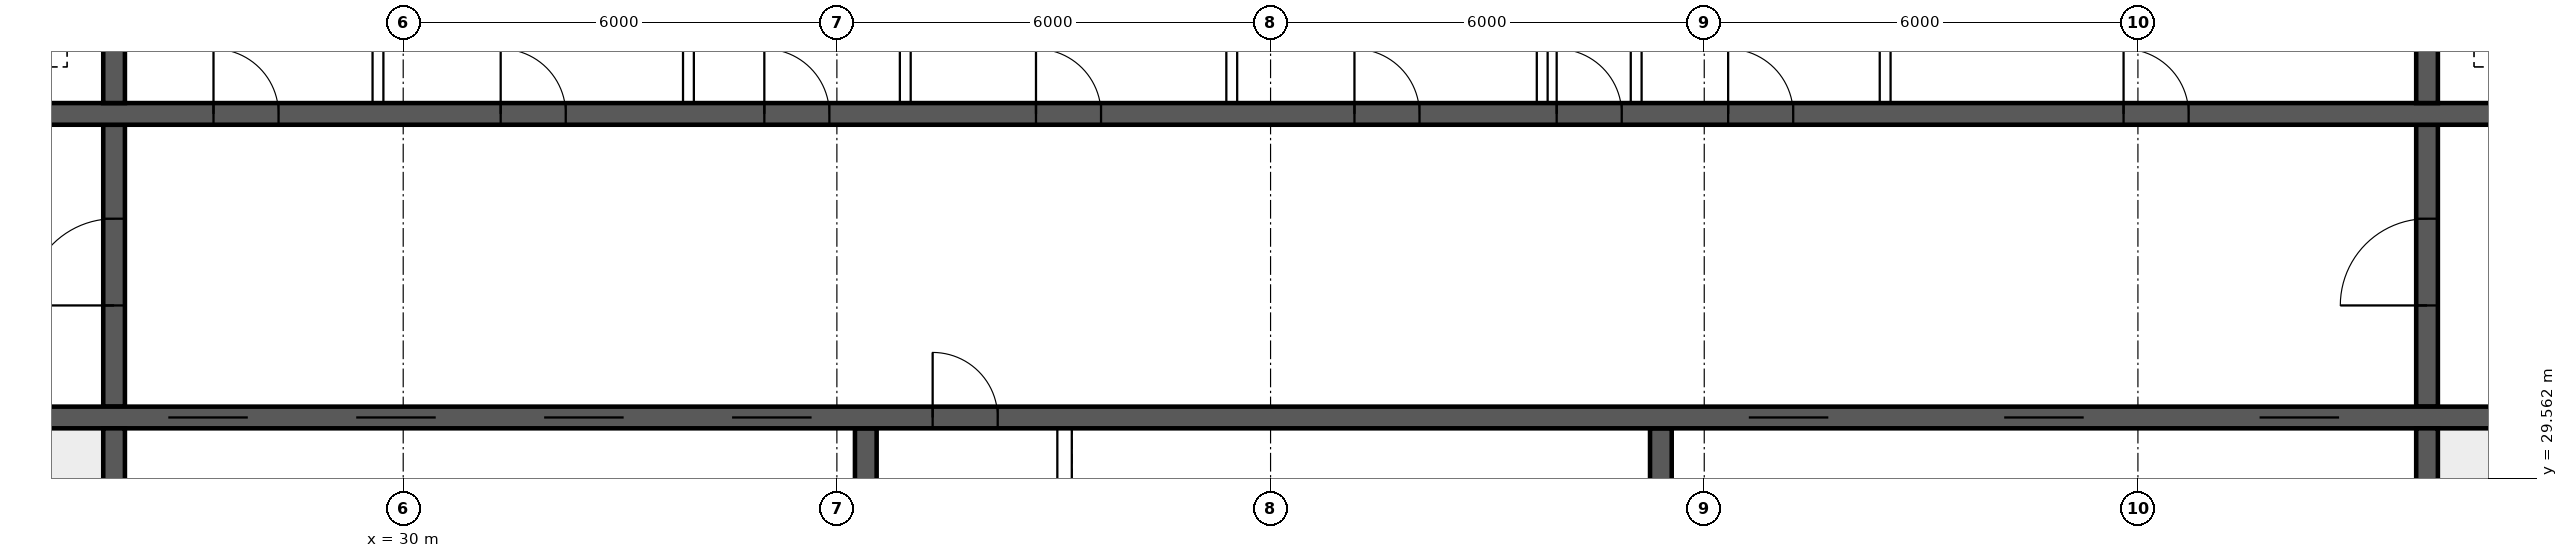
"""IFC4 building model, lengths in metres.
Left out: names, types, materials, properties, quantities, classifications, styles, units other than length and angle.
Written with IfcOpenShell. Run it as: python <this file> out.ifc"""

import sys

from ifc_helpers import new_model, si_unit, direction, frame, frame_2d, origin, place, context, subcontext, project, spatial, rectangle, extrude, element, fill, save


model = new_model("IFC4")
c1 = context("Model", 3, precision=1e-05, world=origin(), true_north=direction((0.0, 1.0)))
c2 = subcontext(c1, "Body", "Model", "MODEL_VIEW")
j1 = project(units=[si_unit("LENGTHUNIT", "METRE"), si_unit("PLANEANGLEUNIT", "RADIAN")], contexts=[c1])
p1 = place(None, origin())
s1 = spatial("IfcSite", under=j1, at=p1, CompositionType="ELEMENT")
p2 = place(p1, origin())
s2 = spatial("IfcBuilding", under=s1, at=p2, CompositionType="ELEMENT")
p3 = place(p2, frame((0.0, 0.0, 106.9)))
s3 = spatial("IfcBuildingStorey", under=s2, at=p3, CompositionType="ELEMENT", Elevation=106.9)
p4 = place(p3, frame((18.475, 30.4, 0.0), z_axis=(0.0, 0.0, 1.0), x_axis=(1.0, 0.0, 0.0)))
e1 = element("IfcWall", 1, at=p4, inside=s3, PredefinedType="SHEAR", context=c2, shape_type="SweptSolid", body=[
    extrude(rectangle(XDim=47.05, YDim=0.3, at=frame_2d((23.525, 0.0))), origin(), (0.0, 0.0, 1.0), 3.75),
])
p5 = place(p4, frame((0.4, 0.0, 0.0)))
e2 = element("IfcOpeningElement", 2, at=p5, cuts=e1, PredefinedType="OPENING", context=c2, shape_type="SweptSolid", body=[
    extrude(rectangle(XDim=1.0, YDim=2.1, at=frame_2d((0.5, 1.05))), frame((0.0, 0.16, 0.0), z_axis=(0.0, -1.0, 0.0), x_axis=(1.0, 0.0, 0.0)), (0.0, 0.0, 1.0), 0.32),
])
p6 = place(p4, frame((45.65, 0.0, 0.0)))
e3 = element("IfcOpeningElement", 3, at=p6, cuts=e1, PredefinedType="OPENING", context=c2, shape_type="SweptSolid", body=[
    extrude(rectangle(XDim=1.0, YDim=2.1, at=frame_2d((0.5, 1.05))), frame((0.0, 0.16, 0.0), z_axis=(0.0, -1.0, 0.0), x_axis=(1.0, 0.0, 0.0)), (0.0, 0.0, 1.0), 0.32),
])
p7 = place(p4, frame((8.275, 0.0, 0.0)))
e4 = element("IfcOpeningElement", 4, at=p7, cuts=e1, PredefinedType="OPENING", context=c2, shape_type="SweptSolid", body=[
    extrude(rectangle(XDim=1.1, YDim=2.1, at=frame_2d((0.55, 1.05))), frame((0.0, 0.16, 0.0), z_axis=(0.0, -1.0, 0.0), x_axis=(1.0, 0.0, 0.0)), (0.0, 0.0, 1.0), 0.32),
])
p8 = place(p4, frame((10.875, 0.0, 0.0)))
e5 = element("IfcOpeningElement", 5, at=p8, cuts=e1, PredefinedType="OPENING", context=c2, shape_type="SweptSolid", body=[
    extrude(rectangle(XDim=1.1, YDim=2.1, at=frame_2d((0.55, 1.05))), frame((0.0, 0.16, 0.0), z_axis=(0.0, -1.0, 0.0), x_axis=(1.0, 0.0, 0.0)), (0.0, 0.0, 1.0), 0.32),
])
p9 = place(p4, frame((13.475, 0.0, 0.0)))
e6 = element("IfcOpeningElement", 6, at=p9, cuts=e1, PredefinedType="OPENING", context=c2, shape_type="SweptSolid", body=[
    extrude(rectangle(XDim=1.1, YDim=2.1, at=frame_2d((0.55, 1.05))), frame((0.0, 0.16, 0.0), z_axis=(0.0, -1.0, 0.0), x_axis=(1.0, 0.0, 0.0)), (0.0, 0.0, 1.0), 0.32),
])
p10 = place(p4, frame((16.075, 0.0, 0.0)))
e7 = element("IfcOpeningElement", 7, at=p10, cuts=e1, PredefinedType="OPENING", context=c2, shape_type="SweptSolid", body=[
    extrude(rectangle(XDim=1.1, YDim=2.1, at=frame_2d((0.55, 1.05))), frame((0.0, 0.16, 0.0), z_axis=(0.0, -1.0, 0.0), x_axis=(1.0, 0.0, 0.0)), (0.0, 0.0, 1.0), 0.32),
])
p11 = place(p4, frame((18.85, 0.0, 0.0)))
e8 = element("IfcOpeningElement", 8, at=p11, cuts=e1, PredefinedType="OPENING", context=c2, shape_type="SweptSolid", body=[
    extrude(rectangle(XDim=0.9, YDim=2.1, at=frame_2d((0.45, 1.05))), frame((0.0, 0.16, 0.0), z_axis=(0.0, -1.0, 0.0), x_axis=(1.0, 0.0, 0.0)), (0.0, 0.0, 1.0), 0.32),
])
p12 = place(p4, frame((30.142, 0.0, 0.0)))
e9 = element("IfcOpeningElement", 9, at=p12, cuts=e1, PredefinedType="OPENING", context=c2, shape_type="SweptSolid", body=[
    extrude(rectangle(XDim=1.1, YDim=2.1, at=frame_2d((0.55, 1.05))), frame((0.0, 0.16, 0.0), z_axis=(0.0, -1.0, 0.0), x_axis=(1.0, 0.0, 0.0)), (0.0, 0.0, 1.0), 0.32),
])
p13 = place(p4, frame((33.675, 0.0, 0.0)))
e10 = element("IfcOpeningElement", 10, at=p13, cuts=e1, PredefinedType="OPENING", context=c2, shape_type="SweptSolid", body=[
    extrude(rectangle(XDim=1.1, YDim=2.1, at=frame_2d((0.55, 1.05))), frame((0.0, 0.16, 0.0), z_axis=(0.0, -1.0, 0.0), x_axis=(1.0, 0.0, 0.0)), (0.0, 0.0, 1.0), 0.32),
])
p14 = place(p4, frame((37.208, 0.0, 0.0)))
e11 = element("IfcOpeningElement", 11, at=p14, cuts=e1, PredefinedType="OPENING", context=c2, shape_type="SweptSolid", body=[
    extrude(rectangle(XDim=1.1, YDim=2.1, at=frame_2d((0.55, 1.05))), frame((0.0, 0.16, 0.0), z_axis=(0.0, -1.0, 0.0), x_axis=(1.0, 0.0, 0.0)), (0.0, 0.0, 1.0), 0.32),
])
p15 = place(p3, frame((18.475, 34.6, 0.0), z_axis=(0.0, 0.0, 1.0), x_axis=(1.0, 0.0, 0.0)))
e12 = element("IfcWall", 12, at=p15, inside=s3, PredefinedType="SHEAR", context=c2, shape_type="SweptSolid", body=[
    extrude(rectangle(XDim=47.05, YDim=0.3, at=frame_2d((23.525, 0.0))), origin(), (0.0, 0.0, 1.0), 3.75),
])
p16 = place(p15, frame((0.9, 0.0, 0.0)))
e13 = element("IfcOpeningElement", 13, at=p16, cuts=e12, PredefinedType="OPENING", context=c2, shape_type="SweptSolid", body=[
    extrude(rectangle(XDim=1.1, YDim=2.1, at=frame_2d((0.55, 1.05))), frame((0.0, 0.16, 0.0), z_axis=(0.0, -1.0, 0.0), x_axis=(1.0, 0.0, 0.0)), (0.0, 0.0, 1.0), 0.32),
])
p17 = place(p15, frame((45.05, 0.0, 0.0)))
e14 = element("IfcOpeningElement", 14, at=p17, cuts=e12, PredefinedType="OPENING", context=c2, shape_type="SweptSolid", body=[
    extrude(rectangle(XDim=1.1, YDim=2.1, at=frame_2d((0.55, 1.05))), frame((0.0, 0.16, 0.0), z_axis=(0.0, -1.0, 0.0), x_axis=(1.0, 0.0, 0.0)), (0.0, 0.0, 1.0), 0.32),
])
p18 = place(p15, frame((4.125, 0.0, 0.0)))
e15 = element("IfcOpeningElement", 15, at=p18, cuts=e12, PredefinedType="OPENING", context=c2, shape_type="SweptSolid", body=[
    extrude(rectangle(XDim=0.9, YDim=2.1, at=frame_2d((0.45, 1.05))), frame((0.0, 0.16, 0.0), z_axis=(0.0, -1.0, 0.0), x_axis=(1.0, 0.0, 0.0)), (0.0, 0.0, 1.0), 0.32),
])
p19 = place(p15, frame((42.025, 0.0, 0.0)))
e16 = element("IfcOpeningElement", 16, at=p19, cuts=e12, PredefinedType="OPENING", context=c2, shape_type="SweptSolid", body=[
    extrude(rectangle(XDim=0.9, YDim=2.1, at=frame_2d((0.45, 1.05))), frame((0.0, 0.16, 0.0), z_axis=(0.0, -1.0, 0.0), x_axis=(1.0, 0.0, 0.0)), (0.0, 0.0, 1.0), 0.32),
])
p20 = place(p15, frame((8.9, 0.0, 0.0)))
e17 = element("IfcOpeningElement", 17, at=p20, cuts=e12, PredefinedType="OPENING", context=c2, shape_type="SweptSolid", body=[
    extrude(rectangle(XDim=0.9, YDim=2.1, at=frame_2d((0.45, 1.05))), frame((0.0, 0.16, 0.0), z_axis=(0.0, -1.0, 0.0), x_axis=(1.0, 0.0, 0.0)), (0.0, 0.0, 1.0), 0.32),
])
p21 = place(p15, frame((12.874, 0.0, 0.0)))
e18 = element("IfcOpeningElement", 18, at=p21, cuts=e12, PredefinedType="OPENING", context=c2, shape_type="SweptSolid", body=[
    extrude(rectangle(XDim=0.9, YDim=2.1, at=frame_2d((0.45, 1.05))), frame((0.0, 0.16, 0.0), z_axis=(0.0, -1.0, 0.0), x_axis=(1.0, 0.0, 0.0)), (0.0, 0.0, 1.0), 0.32),
])
p22 = place(p15, frame((16.521, 0.0, 0.0)))
e19 = element("IfcOpeningElement", 19, at=p22, cuts=e12, PredefinedType="OPENING", context=c2, shape_type="SweptSolid", body=[
    extrude(rectangle(XDim=0.9, YDim=2.1, at=frame_2d((0.45, 1.05))), frame((0.0, 0.16, 0.0), z_axis=(0.0, -1.0, 0.0), x_axis=(1.0, 0.0, 0.0)), (0.0, 0.0, 1.0), 0.32),
])
p23 = place(p15, frame((20.28, 0.0, 0.0)))
e20 = element("IfcOpeningElement", 20, at=p23, cuts=e12, PredefinedType="OPENING", context=c2, shape_type="SweptSolid", body=[
    extrude(rectangle(XDim=0.9, YDim=2.1, at=frame_2d((0.45, 1.05))), frame((0.0, 0.16, 0.0), z_axis=(0.0, -1.0, 0.0), x_axis=(1.0, 0.0, 0.0)), (0.0, 0.0, 1.0), 0.32),
])
p24 = place(p15, frame((24.686, 0.0, 0.0)))
e21 = element("IfcOpeningElement", 21, at=p24, cuts=e12, PredefinedType="OPENING", context=c2, shape_type="SweptSolid", body=[
    extrude(rectangle(XDim=0.9, YDim=2.1, at=frame_2d((0.45, 1.05))), frame((0.0, 0.16, 0.0), z_axis=(0.0, -1.0, 0.0), x_axis=(1.0, 0.0, 0.0)), (0.0, 0.0, 1.0), 0.32),
])
p25 = place(p15, frame((27.483, 0.0, 0.0)))
e22 = element("IfcOpeningElement", 22, at=p25, cuts=e12, PredefinedType="OPENING", context=c2, shape_type="SweptSolid", body=[
    extrude(rectangle(XDim=0.9, YDim=2.1, at=frame_2d((0.45, 1.05))), frame((0.0, 0.16, 0.0), z_axis=(0.0, -1.0, 0.0), x_axis=(1.0, 0.0, 0.0)), (0.0, 0.0, 1.0), 0.32),
])
p26 = place(p15, frame((29.856, 0.0, 0.0)))
e23 = element("IfcOpeningElement", 23, at=p26, cuts=e12, PredefinedType="OPENING", context=c2, shape_type="SweptSolid", body=[
    extrude(rectangle(XDim=0.9, YDim=2.1, at=frame_2d((0.45, 1.05))), frame((0.0, 0.16, 0.0), z_axis=(0.0, -1.0, 0.0), x_axis=(1.0, 0.0, 0.0)), (0.0, 0.0, 1.0), 0.32),
])
p27 = place(p15, frame((35.326, 0.0, 0.0)))
e24 = element("IfcOpeningElement", 24, at=p27, cuts=e12, PredefinedType="OPENING", context=c2, shape_type="SweptSolid", body=[
    extrude(rectangle(XDim=0.9, YDim=2.1, at=frame_2d((0.45, 1.05))), frame((0.0, 0.16, 0.0), z_axis=(0.0, -1.0, 0.0), x_axis=(1.0, 0.0, 0.0)), (0.0, 0.0, 1.0), 0.32),
])
for number, where, z_axis, x_axis in (
    (25, (26.0, 26.275, 0.0), (0.0, 0.0, 1.0), (0.0, 1.0, 0.0)),
    (26, (58.0, 26.275, 0.0), (0.0, 0.0, 1.0), (0.0, 1.0, 0.0)),
):
    element("IfcWall", number, at=place(p3, frame(where, z_axis=z_axis, x_axis=x_axis)), inside=s3, PredefinedType="SHEAR", context=c2, shape_type="SweptSolid", body=[
        extrude(rectangle(XDim=3.975, YDim=0.3, at=frame_2d((1.988, 0.0))), origin(), (0.0, 0.0, 1.0), 3.75),
    ])
p28 = place(p3, frame((26.0, 30.55, 0.0), z_axis=(0.0, 0.0, 1.0), x_axis=(0.0, 1.0, 0.0)))
e27 = element("IfcWall", 27, at=p28, inside=s3, PredefinedType="SHEAR", context=c2, shape_type="SweptSolid", body=[
    extrude(rectangle(XDim=3.9, YDim=0.3, at=frame_2d((1.95, 0.0))), origin(), (0.0, 0.0, 1.0), 3.75),
])
p29 = place(p28, frame((1.4, 0.0, 0.0)))
e28 = element("IfcOpeningElement", 28, at=p29, cuts=e27, PredefinedType="OPENING", context=c2, shape_type="SweptSolid", body=[
    extrude(rectangle(XDim=1.2, YDim=2.1, at=frame_2d((0.6, 1.05))), frame((0.0, 0.16, 0.0), z_axis=(0.0, -1.0, 0.0), x_axis=(1.0, 0.0, 0.0)), (0.0, 0.0, 1.0), 0.32),
])
p30 = place(p3, frame((58.0, 30.55, 0.0), z_axis=(0.0, 0.0, 1.0), x_axis=(0.0, 1.0, 0.0)))
e29 = element("IfcWall", 29, at=p30, inside=s3, PredefinedType="SHEAR", context=c2, shape_type="SweptSolid", body=[
    extrude(rectangle(XDim=3.9, YDim=0.3, at=frame_2d((1.95, 0.0))), origin(), (0.0, 0.0, 1.0), 3.75),
])
p31 = place(p30, frame((1.4, 0.0, 0.0)))
e30 = element("IfcOpeningElement", 30, at=p31, cuts=e29, PredefinedType="OPENING", context=c2, shape_type="SweptSolid", body=[
    extrude(rectangle(XDim=1.2, YDim=2.1, at=frame_2d((0.6, 1.05))), frame((0.0, 0.16, 0.0), z_axis=(0.0, -1.0, 0.0), x_axis=(1.0, 0.0, 0.0)), (0.0, 0.0, 1.0), 0.32),
])
for number, where, z_axis, x_axis in (
    (31, (26.0, 34.75, 0.0), (0.0, 0.0, 1.0), (0.0, 1.0, 0.0)),
    (32, (58.0, 34.75, 0.0), (0.0, 0.0, 1.0), (0.0, 1.0, 0.0)),
):
    element("IfcWall", number, at=place(p3, frame(where, z_axis=z_axis, x_axis=x_axis)), inside=s3, PredefinedType="SHEAR", context=c2, shape_type="SweptSolid", body=[
        extrude(rectangle(XDim=2.975, YDim=0.3, at=frame_2d((1.488, 0.0))), origin(), (0.0, 0.0, 1.0), 3.75),
    ])
for number, where, z_axis, x_axis in (
    (33, (36.4, 26.275, 0.0), (0.0, 0.0, 1.0), (0.0, 1.0, 0.0)),
    (34, (47.4, 26.275, 0.0), (0.0, 0.0, 1.0), (0.0, 1.0, 0.0)),
):
    element("IfcWall", number, at=place(p3, frame(where, z_axis=z_axis, x_axis=x_axis)), inside=s3, PredefinedType="SHEAR", context=c2, shape_type="SweptSolid", body=[
        extrude(rectangle(XDim=3.975, YDim=0.3, at=frame_2d((1.988, 0.0))), origin(), (0.0, 0.0, 1.0), 3.75),
    ])
for number, where, z_axis, x_axis in (
    (35, (29.651, 34.75, 0.0), (0.0, 0.0, 1.0), (0.0, 1.0, 0.0)),
    (36, (33.946, 34.75, 0.0), (0.0, 0.0, 1.0), (0.0, 1.0, 0.0)),
    (37, (36.946, 34.75, 0.0), (0.0, 0.0, 1.0), (0.0, 1.0, 0.0)),
    (38, (41.463, 34.75, 0.0), (0.0, 0.0, 1.0), (0.0, 1.0, 0.0)),
    (39, (45.758, 34.75, 0.0), (0.0, 0.0, 1.0), (0.0, 1.0, 0.0)),
    (40, (47.058, 34.75, 0.0), (0.0, 0.0, 1.0), (0.0, 1.0, 0.0)),
    (41, (50.503, 34.75, 0.0), (0.0, 0.0, 1.0), (0.0, 1.0, 0.0)),
):
    element("IfcWall", number, at=place(p3, frame(where, z_axis=z_axis, x_axis=x_axis)), inside=s3, PredefinedType="SOLIDWALL", context=c2, shape_type="SweptSolid", body=[
        extrude(rectangle(XDim=2.975, YDim=0.15, at=frame_2d((1.488, 0.0))), origin(), (0.0, 0.0, 1.0), 3.5),
    ])
p32 = place(p3, frame((39.15, 26.275, 0.0), z_axis=(0.0, 0.0, 1.0), x_axis=(0.0, 1.0, 0.0)))
e42 = element("IfcWall", 42, at=p32, inside=s3, PredefinedType="SOLIDWALL", context=c2, shape_type="SweptSolid", body=[
    extrude(rectangle(XDim=3.975, YDim=0.2, at=frame_2d((1.988, 0.0))), origin(), (0.0, 0.0, 1.0), 3.5),
])
p33 = place(p29, origin())
e43 = element("IfcDoor", 43, at=p33, inside=s3, OperationType="SINGLE_SWING_LEFT", PredefinedType="DOOR", context=c2, shape_type="SweptSolid", body=[
    extrude(rectangle(XDim=1.2, YDim=2.1, at=frame_2d((0.6, 1.05))), frame((0.0, 0.025, 0.0), z_axis=(0.0, -1.0, 0.0), x_axis=(1.0, 0.0, 0.0)), (0.0, 0.0, 1.0), 0.05),
])
fill(e28, e43)
p34 = place(p31, origin())
e44 = element("IfcDoor", 44, at=p34, inside=s3, OperationType="SINGLE_SWING_LEFT", PredefinedType="DOOR", context=c2, shape_type="SweptSolid", body=[
    extrude(rectangle(XDim=1.2, YDim=2.1, at=frame_2d((0.6, 1.05))), frame((0.0, 0.025, 0.0), z_axis=(0.0, -1.0, 0.0), x_axis=(1.0, 0.0, 0.0)), (0.0, 0.0, 1.0), 0.05),
])
fill(e30, e44)
p35 = place(p20, origin())
e45 = element("IfcDoor", 45, at=p35, inside=s3, OperationType="SINGLE_SWING_LEFT", PredefinedType="DOOR", context=c2, shape_type="SweptSolid", body=[
    extrude(rectangle(XDim=0.9, YDim=2.1, at=frame_2d((0.45, 1.05))), frame((0.0, 0.025, 0.0), z_axis=(0.0, -1.0, 0.0), x_axis=(1.0, 0.0, 0.0)), (0.0, 0.0, 1.0), 0.05),
])
fill(e17, e45)
p36 = place(p21, origin())
e46 = element("IfcDoor", 46, at=p36, inside=s3, OperationType="SINGLE_SWING_LEFT", PredefinedType="DOOR", context=c2, shape_type="SweptSolid", body=[
    extrude(rectangle(XDim=0.9, YDim=2.1, at=frame_2d((0.45, 1.05))), frame((0.0, 0.025, 0.0), z_axis=(0.0, -1.0, 0.0), x_axis=(1.0, 0.0, 0.0)), (0.0, 0.0, 1.0), 0.05),
])
fill(e18, e46)
p37 = place(p22, origin())
e47 = element("IfcDoor", 47, at=p37, inside=s3, OperationType="SINGLE_SWING_LEFT", PredefinedType="DOOR", context=c2, shape_type="SweptSolid", body=[
    extrude(rectangle(XDim=0.9, YDim=2.1, at=frame_2d((0.45, 1.05))), frame((0.0, 0.025, 0.0), z_axis=(0.0, -1.0, 0.0), x_axis=(1.0, 0.0, 0.0)), (0.0, 0.0, 1.0), 0.05),
])
fill(e19, e47)
p38 = place(p23, origin())
e48 = element("IfcDoor", 48, at=p38, inside=s3, OperationType="SINGLE_SWING_LEFT", PredefinedType="DOOR", context=c2, shape_type="SweptSolid", body=[
    extrude(rectangle(XDim=0.9, YDim=2.1, at=frame_2d((0.45, 1.05))), frame((0.0, 0.025, 0.0), z_axis=(0.0, -1.0, 0.0), x_axis=(1.0, 0.0, 0.0)), (0.0, 0.0, 1.0), 0.05),
])
fill(e20, e48)
p39 = place(p24, origin())
e49 = element("IfcDoor", 49, at=p39, inside=s3, OperationType="SINGLE_SWING_LEFT", PredefinedType="DOOR", context=c2, shape_type="SweptSolid", body=[
    extrude(rectangle(XDim=0.9, YDim=2.1, at=frame_2d((0.45, 1.05))), frame((0.0, 0.025, 0.0), z_axis=(0.0, -1.0, 0.0), x_axis=(1.0, 0.0, 0.0)), (0.0, 0.0, 1.0), 0.05),
])
fill(e21, e49)
p40 = place(p25, origin())
e50 = element("IfcDoor", 50, at=p40, inside=s3, OperationType="SINGLE_SWING_LEFT", PredefinedType="DOOR", context=c2, shape_type="SweptSolid", body=[
    extrude(rectangle(XDim=0.9, YDim=2.1, at=frame_2d((0.45, 1.05))), frame((0.0, 0.025, 0.0), z_axis=(0.0, -1.0, 0.0), x_axis=(1.0, 0.0, 0.0)), (0.0, 0.0, 1.0), 0.05),
])
fill(e22, e50)
p41 = place(p26, origin())
e51 = element("IfcDoor", 51, at=p41, inside=s3, OperationType="SINGLE_SWING_LEFT", PredefinedType="DOOR", context=c2, shape_type="SweptSolid", body=[
    extrude(rectangle(XDim=0.9, YDim=2.1, at=frame_2d((0.45, 1.05))), frame((0.0, 0.025, 0.0), z_axis=(0.0, -1.0, 0.0), x_axis=(1.0, 0.0, 0.0)), (0.0, 0.0, 1.0), 0.05),
])
fill(e23, e51)
p42 = place(p27, origin())
e52 = element("IfcDoor", 52, at=p42, inside=s3, OperationType="SINGLE_SWING_LEFT", PredefinedType="DOOR", context=c2, shape_type="SweptSolid", body=[
    extrude(rectangle(XDim=0.9, YDim=2.1, at=frame_2d((0.45, 1.05))), frame((0.0, 0.025, 0.0), z_axis=(0.0, -1.0, 0.0), x_axis=(1.0, 0.0, 0.0)), (0.0, 0.0, 1.0), 0.05),
])
fill(e24, e52)
p43 = place(p7, origin())
e53 = element("IfcDoor", 53, at=p43, inside=s3, OperationType="DOUBLE_DOOR_SLIDING", PredefinedType="DOOR", context=c2, shape_type="SweptSolid", body=[
    extrude(rectangle(XDim=1.1, YDim=2.1, at=frame_2d((0.55, 1.05))), frame((0.0, 0.025, 0.0), z_axis=(0.0, -1.0, 0.0), x_axis=(1.0, 0.0, 0.0)), (0.0, 0.0, 1.0), 0.05),
])
fill(e4, e53)
p44 = place(p8, origin())
e54 = element("IfcDoor", 54, at=p44, inside=s3, OperationType="DOUBLE_DOOR_SLIDING", PredefinedType="DOOR", context=c2, shape_type="SweptSolid", body=[
    extrude(rectangle(XDim=1.1, YDim=2.1, at=frame_2d((0.55, 1.05))), frame((0.0, 0.025, 0.0), z_axis=(0.0, -1.0, 0.0), x_axis=(1.0, 0.0, 0.0)), (0.0, 0.0, 1.0), 0.05),
])
fill(e5, e54)
p45 = place(p9, origin())
e55 = element("IfcDoor", 55, at=p45, inside=s3, OperationType="DOUBLE_DOOR_SLIDING", PredefinedType="DOOR", context=c2, shape_type="SweptSolid", body=[
    extrude(rectangle(XDim=1.1, YDim=2.1, at=frame_2d((0.55, 1.05))), frame((0.0, 0.025, 0.0), z_axis=(0.0, -1.0, 0.0), x_axis=(1.0, 0.0, 0.0)), (0.0, 0.0, 1.0), 0.05),
])
fill(e6, e55)
p46 = place(p10, origin())
e56 = element("IfcDoor", 56, at=p46, inside=s3, OperationType="DOUBLE_DOOR_SLIDING", PredefinedType="DOOR", context=c2, shape_type="SweptSolid", body=[
    extrude(rectangle(XDim=1.1, YDim=2.1, at=frame_2d((0.55, 1.05))), frame((0.0, 0.025, 0.0), z_axis=(0.0, -1.0, 0.0), x_axis=(1.0, 0.0, 0.0)), (0.0, 0.0, 1.0), 0.05),
])
fill(e7, e56)
p47 = place(p11, origin())
e57 = element("IfcDoor", 57, at=p47, inside=s3, OperationType="SINGLE_SWING_LEFT", PredefinedType="DOOR", context=c2, shape_type="SweptSolid", body=[
    extrude(rectangle(XDim=0.9, YDim=2.1, at=frame_2d((0.45, 1.05))), frame((0.0, 0.025, 0.0), z_axis=(0.0, -1.0, 0.0), x_axis=(1.0, 0.0, 0.0)), (0.0, 0.0, 1.0), 0.05),
])
fill(e8, e57)
p48 = place(p12, origin())
e58 = element("IfcDoor", 58, at=p48, inside=s3, OperationType="DOUBLE_DOOR_SLIDING", PredefinedType="DOOR", context=c2, shape_type="SweptSolid", body=[
    extrude(rectangle(XDim=1.1, YDim=2.1, at=frame_2d((0.55, 1.05))), frame((0.0, 0.025, 0.0), z_axis=(0.0, -1.0, 0.0), x_axis=(1.0, 0.0, 0.0)), (0.0, 0.0, 1.0), 0.05),
])
fill(e9, e58)
p49 = place(p13, origin())
e59 = element("IfcDoor", 59, at=p49, inside=s3, OperationType="DOUBLE_DOOR_SLIDING", PredefinedType="DOOR", context=c2, shape_type="SweptSolid", body=[
    extrude(rectangle(XDim=1.1, YDim=2.1, at=frame_2d((0.55, 1.05))), frame((0.0, 0.025, 0.0), z_axis=(0.0, -1.0, 0.0), x_axis=(1.0, 0.0, 0.0)), (0.0, 0.0, 1.0), 0.05),
])
fill(e10, e59)
p50 = place(p14, origin())
e60 = element("IfcDoor", 60, at=p50, inside=s3, OperationType="DOUBLE_DOOR_SLIDING", PredefinedType="DOOR", context=c2, shape_type="SweptSolid", body=[
    extrude(rectangle(XDim=1.1, YDim=2.1, at=frame_2d((0.55, 1.05))), frame((0.0, 0.025, 0.0), z_axis=(0.0, -1.0, 0.0), x_axis=(1.0, 0.0, 0.0)), (0.0, 0.0, 1.0), 0.05),
])
fill(e11, e60)
save(model, sys.argv[1])
